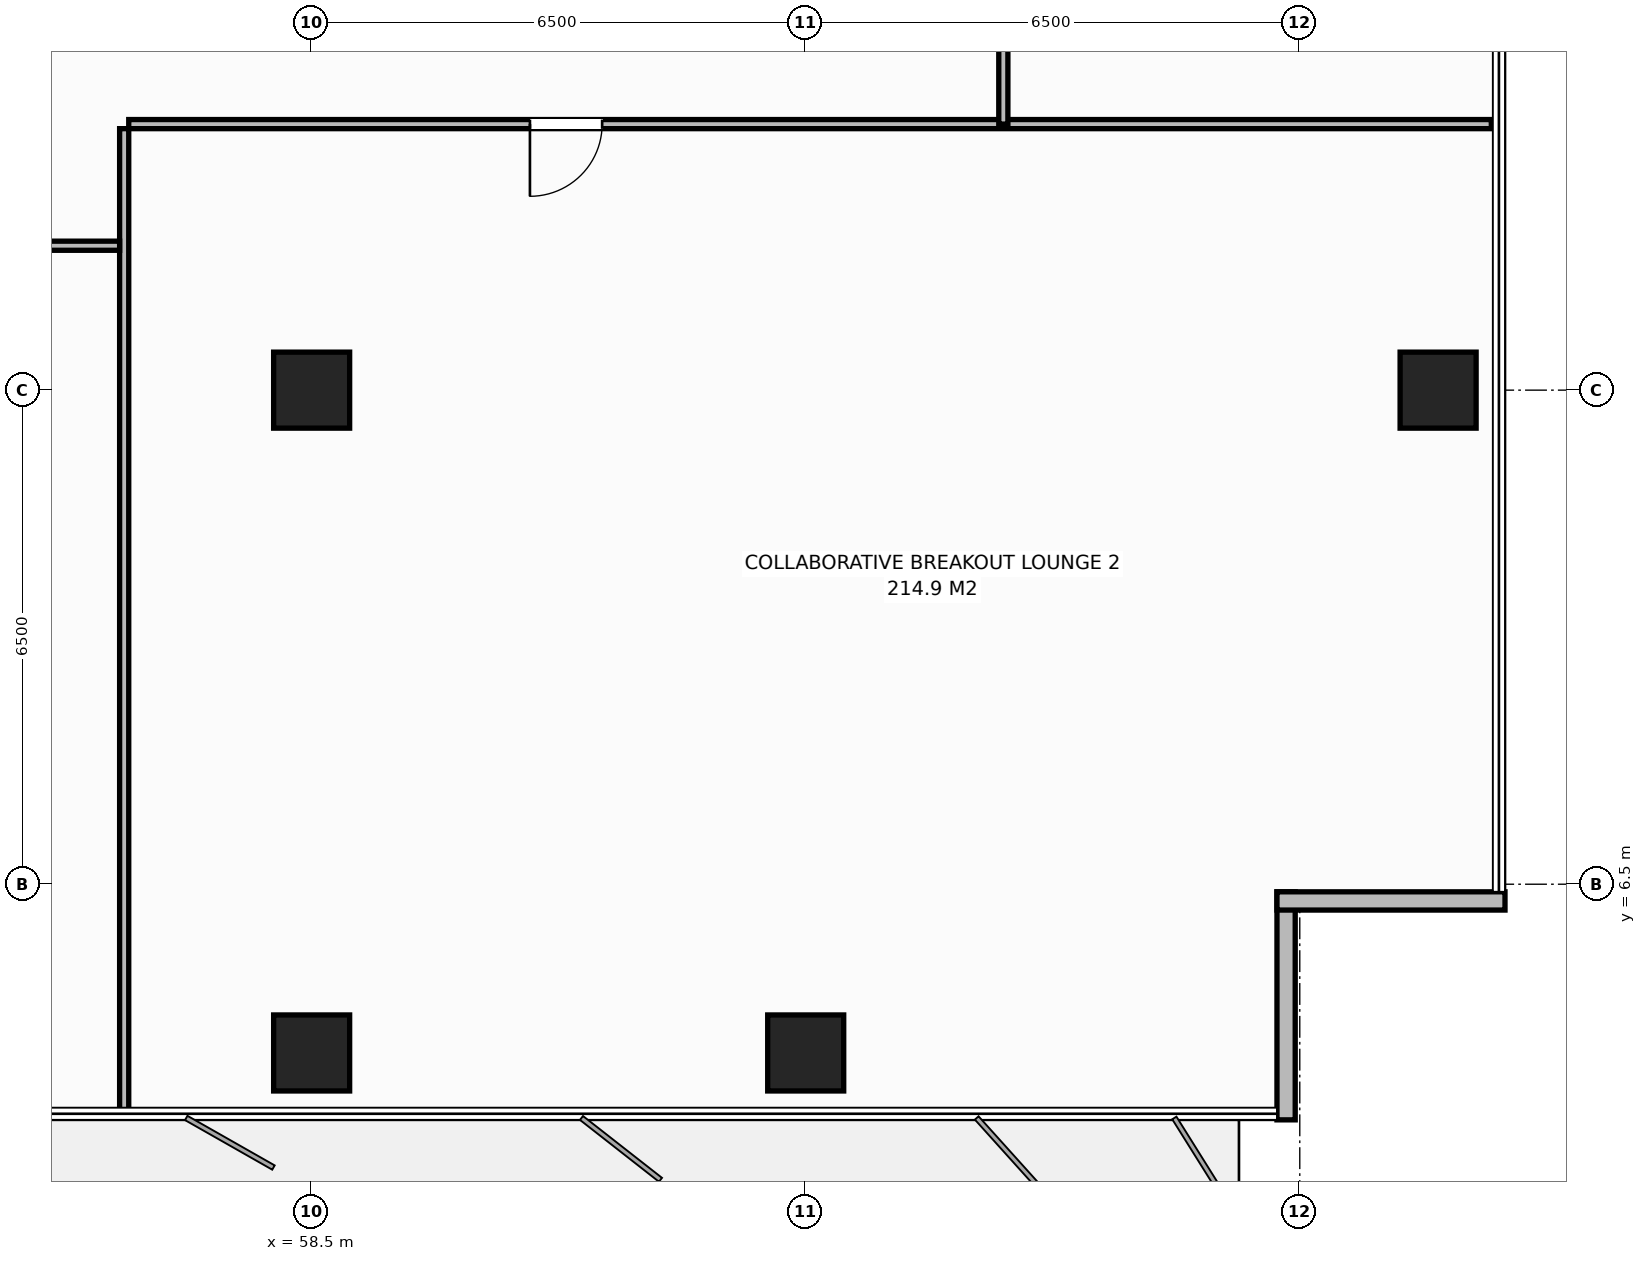
"""IFC4 building model, lengths in metres.
Left out: names, types, materials, properties, quantities, classifications, styles, units other than length and angle.
Written with IfcOpenShell. Run it as: python <this file> out.ifc"""

import sys

from ifc_helpers import new_model, si_unit, direction, frame, frame_2d, origin, origin_2d, place, context, subcontext, project, spatial, rectangle, extrude, element, fill, save


model = new_model("IFC4")
c1 = context("Model", 3, precision=1e-05, world=origin(), true_north=direction((0.0, 1.0)))
c2 = subcontext(c1, "Body", "Model", "MODEL_VIEW")
j1 = project(units=[si_unit("LENGTHUNIT", "METRE"), si_unit("PLANEANGLEUNIT", "RADIAN")], contexts=[c1])
p1 = place(None, origin())
s1 = spatial("IfcSite", under=j1, at=p1, CompositionType="ELEMENT")
p2 = place(p1, origin())
s2 = spatial("IfcBuilding", under=s1, at=p2, CompositionType="ELEMENT")
p3 = place(p2, frame((0.0, 0.0, 144.2)))
s3 = spatial("IfcBuildingStorey", under=s2, at=p3, CompositionType="ELEMENT", Elevation=144.2)
for number, where, z_axis, x_axis in (
    (1, (58.5, 13.0, 0.0), (0.0, 0.0, 1.0), (1.0, 0.0, 0.0)),
    (2, (58.5, 4.28, 0.0), (0.0, 0.0, 1.0), (1.0, 0.0, 0.0)),
    (3, (65.0, 4.28, 0.0), (0.0, 0.0, 1.0), (1.0, 0.0, 0.0)),
    (4, (73.32, 13.0, 0.0), (0.0, 0.0, 1.0), (1.0, 0.0, 0.0)),
):
    element("IfcColumn", number, at=place(p3, frame(where, z_axis=z_axis, x_axis=x_axis)), inside=s3, PredefinedType="COLUMN", context=c2, shape_type="SweptSolid", body=[
        extrude(rectangle(XDim=1.0, YDim=1.0, at=origin_2d()), origin(), (0.0, 0.0, 1.0), 3.8),
    ])
for number, where, z_axis, x_axis in (
    (5, (71.32, 6.4, 0.0), (0.0, 0.0, 1.0), (0.0, -1.0, 0.0)),
    (6, (74.2, 6.28, 0.0), (0.0, 0.0, 1.0), (-1.0, 0.0, 0.0)),
):
    element("IfcWall", number, at=place(p3, frame(where, z_axis=z_axis, x_axis=x_axis)), inside=s3, PredefinedType="STANDARD", context=c2, shape_type="SweptSolid", body=[
        extrude(rectangle(XDim=3.0, YDim=0.24, at=frame_2d((1.5, 0.0))), origin(), (0.0, 0.0, 1.0), 3.572),
    ])
p4 = place(p3, frame((56.034, 3.42, 0.0), z_axis=(0.0, 0.0, 1.0), x_axis=(0.0, 1.0, 0.0)))
e7 = element("IfcWall", 7, at=p4, inside=s3, PredefinedType="PARTITIONING", context=c2, shape_type="SweptSolid", body=[
    extrude(rectangle(XDim=13.02, YDim=0.12, at=frame_2d((6.51, 0.0))), origin(), (0.0, 0.0, 1.0), 3.572),
])
p5 = place(p3, frame((44.481, 14.9, 0.0), z_axis=(0.0, 0.0, 1.0), x_axis=(1.0, 0.0, 0.0)))
e8 = element("IfcWall", 8, at=p5, inside=s3, PredefinedType="PARTITIONING", context=c2, shape_type="SweptSolid", body=[
    extrude(rectangle(XDim=11.492, YDim=0.12, at=frame_2d((5.746, 0.0))), origin(), (0.0, 0.0, 1.0), 3.572),
])
p6 = place(p5, frame((5.271, 0.0, 0.0)))
e9 = element("IfcOpeningElement", 9, at=p6, cuts=e8, PredefinedType="OPENING", context=c2, shape_type="SweptSolid", body=[
    extrude(rectangle(XDim=0.95, YDim=2.15, at=frame_2d((0.475, 1.075))), frame((0.0, 0.07, 0.0), z_axis=(0.0, -1.0, 0.0), x_axis=(1.0, 0.0, 0.0)), (0.0, 0.0, 1.0), 0.14),
])
p7 = place(p3, frame((56.094, 16.5, 0.0), z_axis=(0.0, 0.0, 1.0), x_axis=(1.0, 0.0, 0.0)))
e10 = element("IfcWall", 10, at=p7, inside=s3, PredefinedType="PARTITIONING", context=c2, shape_type="SweptSolid", body=[
    extrude(rectangle(XDim=17.926, YDim=0.12, at=frame_2d((8.963, 0.0))), origin(), (0.0, 0.0, 1.0), 3.572),
])
p8 = place(p7, frame((5.278, 0.0, 0.0)))
e11 = element("IfcOpeningElement", 11, at=p8, cuts=e10, PredefinedType="OPENING", context=c2, shape_type="SweptSolid", body=[
    extrude(rectangle(XDim=0.95, YDim=2.15, at=frame_2d((0.475, 1.075))), frame((0.0, 0.07, 0.0), z_axis=(0.0, -1.0, 0.0), x_axis=(1.0, 0.0, 0.0)), (0.0, 0.0, 1.0), 0.14),
])
p9 = place(p3, frame((67.6, 16.5, 0.0), z_axis=(0.0, 0.0, 1.0), x_axis=(0.0, 1.0, 0.0)))
e12 = element("IfcWall", 12, at=p9, inside=s3, PredefinedType="PARTITIONING", context=c2, shape_type="SweptSolid", body=[
    extrude(rectangle(XDim=19.0, YDim=0.12, at=frame_2d((9.5, 0.0))), origin(), (0.0, 0.0, 1.0), 3.572),
])
p10 = place(p9, frame((9.025, 0.0, 0.0)))
e13 = element("IfcOpeningElement", 13, at=p10, cuts=e12, PredefinedType="OPENING", context=c2, shape_type="SweptSolid", body=[
    extrude(rectangle(XDim=0.95, YDim=2.15, at=frame_2d((0.475, 1.075))), frame((0.0, 0.07, 0.0), z_axis=(0.0, -1.0, 0.0), x_axis=(1.0, 0.0, 0.0)), (0.0, 0.0, 1.0), 0.14),
])
p11 = place(p8, origin())
e14 = element("IfcDoor", 14, at=p11, inside=s3, OperationType="SINGLE_SWING_RIGHT", PredefinedType="DOOR", context=c2, shape_type="SweptSolid", body=[
    extrude(rectangle(XDim=0.95, YDim=2.15, at=frame_2d((0.475, 1.075))), frame((0.0, 0.025, 0.0), z_axis=(0.0, -1.0, 0.0), x_axis=(1.0, 0.0, 0.0)), (0.0, 0.0, 1.0), 0.05),
])
fill(e11, e14)
save(model, sys.argv[1])
